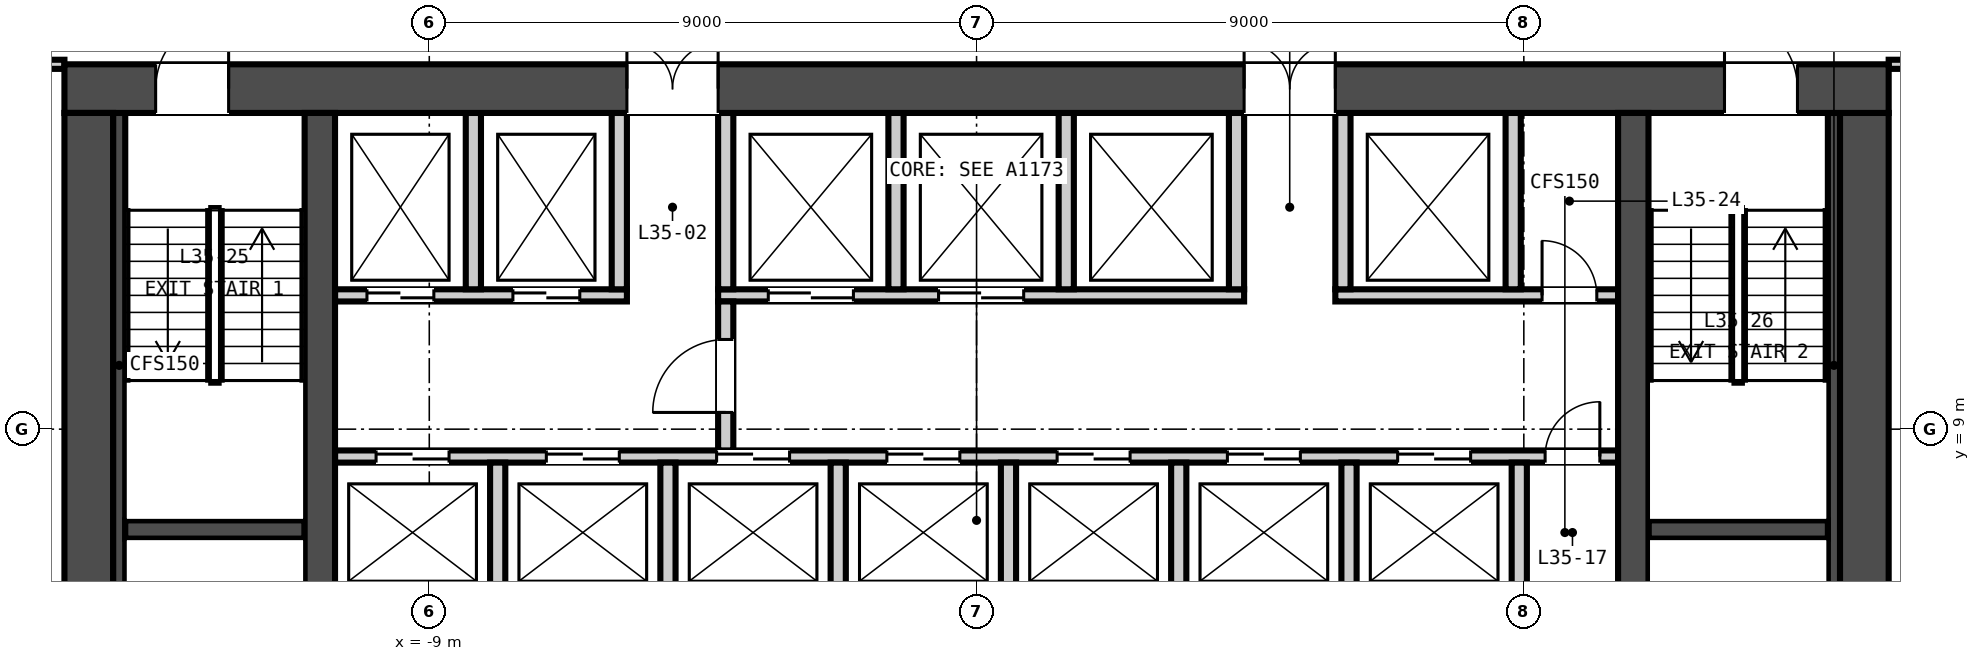
"""IFC4 building model, lengths in metres.
Left out: names, types, materials, properties, quantities, classifications, styles, units other than length and angle.
Written with IfcOpenShell. Run it as: python <this file> out.ifc"""

import sys

from ifc_helpers import new_model, si_unit, direction, frame, frame_2d, origin, place, context, subcontext, project, spatial, rectangle, extrude, element, fill, save


model = new_model("IFC4")
c1 = context("Model", 3, precision=1e-05, world=origin(), true_north=direction((0.0, 1.0)))
c2 = subcontext(c1, "Body", "Model", "MODEL_VIEW")
j1 = project(units=[si_unit("LENGTHUNIT", "METRE"), si_unit("PLANEANGLEUNIT", "RADIAN")], contexts=[c1])
p1 = place(None, origin())
s1 = spatial("IfcSite", under=j1, at=p1, CompositionType="ELEMENT")
p2 = place(p1, origin())
s2 = spatial("IfcBuilding", under=s1, at=p2, CompositionType="ELEMENT")
p3 = place(p2, frame((0.0, 0.0, 144.4)))
s3 = spatial("IfcBuildingStorey", under=s2, at=p3, CompositionType="ELEMENT", Elevation=144.4)
p4 = place(p3, frame((-15.0, 14.6, -0.15), z_axis=(0.0, 0.0, 1.0), x_axis=(1.0, 0.0, 0.0)))
e1 = element("IfcWall", 1, at=p4, inside=s3, PredefinedType="SOLIDWALL", context=c2, shape_type="SweptSolid", body=[
    extrude(rectangle(XDim=30.0, YDim=0.8, at=frame_2d((15.0, 0.0))), origin(), (0.0, 0.0, 1.0), 3.65),
])
p5 = place(p4, frame((9.25, 0.0, 0.15)))
e2 = element("IfcOpeningElement", 2, at=p5, cuts=e1, PredefinedType="OPENING", context=c2, shape_type="SweptSolid", body=[
    extrude(rectangle(XDim=1.5, YDim=2.1, at=frame_2d((0.75, 1.05))), frame((0.0, 0.41, 0.0), z_axis=(0.0, -1.0, 0.0), x_axis=(1.0, 0.0, 0.0)), (0.0, 0.0, 1.0), 0.82),
])
p6 = place(p4, frame((19.4, 0.0, 0.15)))
e3 = element("IfcOpeningElement", 3, at=p6, cuts=e1, PredefinedType="OPENING", context=c2, shape_type="SweptSolid", body=[
    extrude(rectangle(XDim=1.5, YDim=2.1, at=frame_2d((0.75, 1.05))), frame((0.0, 0.41, 0.0), z_axis=(0.0, -1.0, 0.0), x_axis=(1.0, 0.0, 0.0)), (0.0, 0.0, 1.0), 0.82),
])
p7 = place(p4, frame((1.5, 0.0, 0.15)))
e4 = element("IfcOpeningElement", 4, at=p7, cuts=e1, PredefinedType="OPENING", context=c2, shape_type="SweptSolid", body=[
    extrude(rectangle(XDim=1.2, YDim=2.1, at=frame_2d((0.6, 1.05))), frame((0.0, 0.41, 0.0), z_axis=(0.0, -1.0, 0.0), x_axis=(1.0, 0.0, 0.0)), (0.0, 0.0, 1.0), 0.82),
])
p8 = place(p4, frame((27.3, 0.0, 0.15)))
e5 = element("IfcOpeningElement", 5, at=p8, cuts=e1, PredefinedType="OPENING", context=c2, shape_type="SweptSolid", body=[
    extrude(rectangle(XDim=1.2, YDim=2.1, at=frame_2d((0.6, 1.05))), frame((0.0, 0.41, 0.0), z_axis=(0.0, -1.0, 0.0), x_axis=(1.0, 0.0, 0.0)), (0.0, 0.0, 1.0), 0.82),
])
for number, where, z_axis, x_axis in (
    (6, (-14.6, 0.8, -0.15), (0.0, 0.0, 1.0), (0.0, 1.0, 0.0)),
    (7, (14.6, 0.8, -0.15), (0.0, 0.0, 1.0), (0.0, 1.0, 0.0)),
):
    element("IfcWall", number, at=place(p3, frame(where, z_axis=z_axis, x_axis=x_axis)), inside=s3, PredefinedType="SOLIDWALL", context=c2, shape_type="SweptSolid", body=[
        extrude(rectangle(XDim=13.4, YDim=0.8, at=frame_2d((6.7, 0.0))), origin(), (0.0, 0.0, 1.0), 3.65),
    ])
for number, where, z_axis, x_axis in (
    (8, (-10.8, 0.8, -0.15), (0.0, 0.0, 1.0), (0.0, 1.0, 0.0)),
    (9, (10.8, 0.8, -0.15), (0.0, 0.0, 1.0), (0.0, 1.0, 0.0)),
):
    element("IfcWall", number, at=place(p3, frame(where, z_axis=z_axis, x_axis=x_axis)), inside=s3, PredefinedType="SOLIDWALL", context=c2, shape_type="SweptSolid", body=[
        extrude(rectangle(XDim=13.4, YDim=0.5, at=frame_2d((6.7, 0.0))), origin(), (0.0, 0.0, 1.0), 3.65),
    ])
p9 = place(p3, frame((-10.55, 8.55, 0.0), z_axis=(0.0, 0.0, 1.0), x_axis=(1.0, 0.0, 0.0)))
e10 = element("IfcWall", 10, at=p9, inside=s3, PredefinedType="PARTITIONING", context=c2, shape_type="SweptSolid", body=[
    extrude(rectangle(XDim=21.1, YDim=0.2, at=frame_2d((10.55, 0.0))), origin(), (0.0, 0.0, 1.0), 3.5),
])
p10 = place(p9, frame((0.675, 0.0, 0.0)))
e11 = element("IfcOpeningElement", 11, at=p10, cuts=e10, PredefinedType="OPENING", context=c2, shape_type="SweptSolid", body=[
    extrude(rectangle(XDim=1.2, YDim=2.1, at=frame_2d((0.6, 1.05))), frame((0.0, 0.11, 0.0), z_axis=(0.0, -1.0, 0.0), x_axis=(1.0, 0.0, 0.0)), (0.0, 0.0, 1.0), 0.22),
])
p11 = place(p9, frame((3.475, 0.0, 0.0)))
e12 = element("IfcOpeningElement", 12, at=p11, cuts=e10, PredefinedType="OPENING", context=c2, shape_type="SweptSolid", body=[
    extrude(rectangle(XDim=1.2, YDim=2.1, at=frame_2d((0.6, 1.05))), frame((0.0, 0.11, 0.0), z_axis=(0.0, -1.0, 0.0), x_axis=(1.0, 0.0, 0.0)), (0.0, 0.0, 1.0), 0.22),
])
p12 = place(p9, frame((6.275, 0.0, 0.0)))
e13 = element("IfcOpeningElement", 13, at=p12, cuts=e10, PredefinedType="OPENING", context=c2, shape_type="SweptSolid", body=[
    extrude(rectangle(XDim=1.2, YDim=2.1, at=frame_2d((0.6, 1.05))), frame((0.0, 0.11, 0.0), z_axis=(0.0, -1.0, 0.0), x_axis=(1.0, 0.0, 0.0)), (0.0, 0.0, 1.0), 0.22),
])
p13 = place(p9, frame((9.075, 0.0, 0.0)))
e14 = element("IfcOpeningElement", 14, at=p13, cuts=e10, PredefinedType="OPENING", context=c2, shape_type="SweptSolid", body=[
    extrude(rectangle(XDim=1.2, YDim=2.1, at=frame_2d((0.6, 1.05))), frame((0.0, 0.11, 0.0), z_axis=(0.0, -1.0, 0.0), x_axis=(1.0, 0.0, 0.0)), (0.0, 0.0, 1.0), 0.22),
])
p14 = place(p9, frame((11.875, 0.0, 0.0)))
e15 = element("IfcOpeningElement", 15, at=p14, cuts=e10, PredefinedType="OPENING", context=c2, shape_type="SweptSolid", body=[
    extrude(rectangle(XDim=1.2, YDim=2.1, at=frame_2d((0.6, 1.05))), frame((0.0, 0.11, 0.0), z_axis=(0.0, -1.0, 0.0), x_axis=(1.0, 0.0, 0.0)), (0.0, 0.0, 1.0), 0.22),
])
p15 = place(p9, frame((14.675, 0.0, 0.0)))
e16 = element("IfcOpeningElement", 16, at=p15, cuts=e10, PredefinedType="OPENING", context=c2, shape_type="SweptSolid", body=[
    extrude(rectangle(XDim=1.2, YDim=2.1, at=frame_2d((0.6, 1.05))), frame((0.0, 0.11, 0.0), z_axis=(0.0, -1.0, 0.0), x_axis=(1.0, 0.0, 0.0)), (0.0, 0.0, 1.0), 0.22),
])
p16 = place(p9, frame((17.475, 0.0, 0.0)))
e17 = element("IfcOpeningElement", 17, at=p16, cuts=e10, PredefinedType="OPENING", context=c2, shape_type="SweptSolid", body=[
    extrude(rectangle(XDim=1.2, YDim=2.1, at=frame_2d((0.6, 1.05))), frame((0.0, 0.11, 0.0), z_axis=(0.0, -1.0, 0.0), x_axis=(1.0, 0.0, 0.0)), (0.0, 0.0, 1.0), 0.22),
])
p17 = place(p9, frame((19.9, 0.0, 0.0)))
e18 = element("IfcOpeningElement", 18, at=p17, cuts=e10, PredefinedType="OPENING", context=c2, shape_type="SweptSolid", body=[
    extrude(rectangle(XDim=0.9, YDim=2.1, at=frame_2d((0.45, 1.05))), frame((0.0, 0.11, 0.0), z_axis=(0.0, -1.0, 0.0), x_axis=(1.0, 0.0, 0.0)), (0.0, 0.0, 1.0), 0.22),
])
p18 = place(p3, frame((-10.55, 11.2, 0.0), z_axis=(0.0, 0.0, 1.0), x_axis=(1.0, 0.0, 0.0)))
e19 = element("IfcWall", 19, at=p18, inside=s3, PredefinedType="PARTITIONING", context=c2, shape_type="SweptSolid", body=[
    extrude(rectangle(XDim=4.8, YDim=0.2, at=frame_2d((2.4, 0.0))), origin(), (0.0, 0.0, 1.0), 3.5),
])
p19 = place(p18, frame((0.525, 0.0, 0.0)))
e20 = element("IfcOpeningElement", 20, at=p19, cuts=e19, PredefinedType="OPENING", context=c2, shape_type="SweptSolid", body=[
    extrude(rectangle(XDim=1.1, YDim=2.1, at=frame_2d((0.55, 1.05))), frame((0.0, 0.11, 0.0), z_axis=(0.0, -1.0, 0.0), x_axis=(1.0, 0.0, 0.0)), (0.0, 0.0, 1.0), 0.22),
])
p20 = place(p18, frame((2.925, 0.0, 0.0)))
e21 = element("IfcOpeningElement", 21, at=p20, cuts=e19, PredefinedType="OPENING", context=c2, shape_type="SweptSolid", body=[
    extrude(rectangle(XDim=1.1, YDim=2.1, at=frame_2d((0.55, 1.05))), frame((0.0, 0.11, 0.0), z_axis=(0.0, -1.0, 0.0), x_axis=(1.0, 0.0, 0.0)), (0.0, 0.0, 1.0), 0.22),
])
p21 = place(p3, frame((-4.25, 11.2, 0.0), z_axis=(0.0, 0.0, 1.0), x_axis=(1.0, 0.0, 0.0)))
e22 = element("IfcWall", 22, at=p21, inside=s3, PredefinedType="PARTITIONING", context=c2, shape_type="SweptSolid", body=[
    extrude(rectangle(XDim=8.65, YDim=0.2, at=frame_2d((4.325, 0.0))), origin(), (0.0, 0.0, 1.0), 3.5),
])
p22 = place(p21, frame((0.825, 0.0, 0.0)))
e23 = element("IfcOpeningElement", 23, at=p22, cuts=e22, PredefinedType="OPENING", context=c2, shape_type="SweptSolid", body=[
    extrude(rectangle(XDim=1.4, YDim=2.1, at=frame_2d((0.7, 1.05))), frame((0.0, 0.11, 0.0), z_axis=(0.0, -1.0, 0.0), x_axis=(1.0, 0.0, 0.0)), (0.0, 0.0, 1.0), 0.22),
])
p23 = place(p21, frame((3.625, 0.0, 0.0)))
e24 = element("IfcOpeningElement", 24, at=p23, cuts=e22, PredefinedType="OPENING", context=c2, shape_type="SweptSolid", body=[
    extrude(rectangle(XDim=1.4, YDim=2.1, at=frame_2d((0.7, 1.05))), frame((0.0, 0.11, 0.0), z_axis=(0.0, -1.0, 0.0), x_axis=(1.0, 0.0, 0.0)), (0.0, 0.0, 1.0), 0.22),
])
p24 = place(p3, frame((5.9, 11.2, 0.0), z_axis=(0.0, 0.0, 1.0), x_axis=(1.0, 0.0, 0.0)))
e25 = element("IfcWall", 25, at=p24, inside=s3, PredefinedType="PARTITIONING", context=c2, shape_type="SweptSolid", body=[
    extrude(rectangle(XDim=4.65, YDim=0.2, at=frame_2d((2.325, 0.0))), origin(), (0.0, 0.0, 1.0), 3.5),
])
p25 = place(p24, frame((3.4, 0.0, 0.0)))
e26 = element("IfcOpeningElement", 26, at=p25, cuts=e25, PredefinedType="OPENING", context=c2, shape_type="SweptSolid", body=[
    extrude(rectangle(XDim=0.9, YDim=2.1, at=frame_2d((0.45, 1.05))), frame((0.0, 0.11, 0.0), z_axis=(0.0, -1.0, 0.0), x_axis=(1.0, 0.0, 0.0)), (0.0, 0.0, 1.0), 0.22),
])
p26 = place(p3, frame((-4.125, 8.65, 0.0), z_axis=(0.0, 0.0, 1.0), x_axis=(0.0, 1.0, 0.0)))
e27 = element("IfcWall", 27, at=p26, inside=s3, PredefinedType="PARTITIONING", context=c2, shape_type="SweptSolid", body=[
    extrude(rectangle(XDim=2.45, YDim=0.25, at=frame_2d((1.225, 0.0))), origin(), (0.0, 0.0, 1.0), 3.5),
])
p27 = place(p26, frame((0.625, 0.0, 0.0)))
e28 = element("IfcOpeningElement", 28, at=p27, cuts=e27, PredefinedType="OPENING", context=c2, shape_type="SweptSolid", body=[
    extrude(rectangle(XDim=1.2, YDim=2.1, at=frame_2d((0.6, 1.05))), frame((0.0, 0.135, 0.0), z_axis=(0.0, -1.0, 0.0), x_axis=(1.0, 0.0, 0.0)), (0.0, 0.0, 1.0), 0.27),
])
for number, where, z_axis, x_axis in (
    (29, (-7.875, 6.15, 0.0), (0.0, 0.0, 1.0), (0.0, 1.0, 0.0)),
    (30, (-5.075, 6.15, 0.0), (0.0, 0.0, 1.0), (0.0, 1.0, 0.0)),
    (31, (-2.275, 6.15, 0.0), (0.0, 0.0, 1.0), (0.0, 1.0, 0.0)),
    (32, (0.525, 6.15, 0.0), (0.0, 0.0, 1.0), (0.0, 1.0, 0.0)),
    (33, (3.325, 6.15, 0.0), (0.0, 0.0, 1.0), (0.0, 1.0, 0.0)),
    (34, (6.125, 6.15, 0.0), (0.0, 0.0, 1.0), (0.0, 1.0, 0.0)),
    (35, (8.925, 6.15, 0.0), (0.0, 0.0, 1.0), (0.0, 1.0, 0.0)),
):
    element("IfcWall", number, at=place(p3, frame(where, z_axis=z_axis, x_axis=x_axis)), inside=s3, PredefinedType="PARTITIONING", context=c2, shape_type="SweptSolid", body=[
        extrude(rectangle(XDim=2.3, YDim=0.25, at=frame_2d((1.15, 0.0))), origin(), (0.0, 0.0, 1.0), 3.5),
    ])
for number, where, z_axis, x_axis in (
    (36, (-8.275, 11.3, 0.0), (0.0, 0.0, 1.0), (0.0, 1.0, 0.0)),
    (37, (-5.875, 11.3, 0.0), (0.0, 0.0, 1.0), (0.0, 1.0, 0.0)),
    (38, (-4.125, 11.3, 0.0), (0.0, 0.0, 1.0), (0.0, 1.0, 0.0)),
    (39, (-1.325, 11.3, 0.0), (0.0, 0.0, 1.0), (0.0, 1.0, 0.0)),
    (40, (1.475, 11.3, 0.0), (0.0, 0.0, 1.0), (0.0, 1.0, 0.0)),
    (41, (4.275, 11.3, 0.0), (0.0, 0.0, 1.0), (0.0, 1.0, 0.0)),
    (42, (6.025, 11.3, 0.0), (0.0, 0.0, 1.0), (0.0, 1.0, 0.0)),
    (43, (8.825, 11.3, 0.0), (0.0, 0.0, 1.0), (0.0, 1.0, 0.0)),
):
    element("IfcWall", number, at=place(p3, frame(where, z_axis=z_axis, x_axis=x_axis)), inside=s3, PredefinedType="PARTITIONING", context=c2, shape_type="SweptSolid", body=[
        extrude(rectangle(XDim=2.9, YDim=0.25, at=frame_2d((1.45, 0.0))), origin(), (0.0, 0.0, 1.0), 3.5),
    ])
p28 = place(p3, frame((-14.0, 7.35, 0.0), z_axis=(0.0, 0.0, 1.0), x_axis=(1.0, 0.0, 0.0)))
e44 = element("IfcWall", 44, at=p28, inside=s3, PredefinedType="SOLIDWALL", context=c2, shape_type="SweptSolid", body=[
    extrude(rectangle(XDim=2.95, YDim=0.3, at=frame_2d((1.475, 0.0))), origin(), (0.0, 0.0, 1.0), 3.5),
])
p29 = place(p3, frame((-14.1, 0.8, 0.0), z_axis=(0.0, 0.0, 1.0), x_axis=(0.0, 1.0, 0.0)))
e45 = element("IfcWall", 45, at=p29, inside=s3, PredefinedType="SOLIDWALL", context=c2, shape_type="SweptSolid", body=[
    extrude(rectangle(XDim=13.4, YDim=0.2, at=frame_2d((6.7, 0.0))), origin(), (0.0, 0.0, 1.0), 3.5),
])
p30 = place(p3, frame((11.05, 7.35, 0.0), z_axis=(0.0, 0.0, 1.0), x_axis=(1.0, 0.0, 0.0)))
e46 = element("IfcWall", 46, at=p30, inside=s3, PredefinedType="SOLIDWALL", context=c2, shape_type="SweptSolid", body=[
    extrude(rectangle(XDim=2.95, YDim=0.3, at=frame_2d((1.475, 0.0))), origin(), (0.0, 0.0, 1.0), 3.5),
])
p31 = place(p3, frame((14.1, 0.8, 0.0), z_axis=(0.0, 0.0, 1.0), x_axis=(0.0, 1.0, 0.0)))
e47 = element("IfcWall", 47, at=p31, inside=s3, PredefinedType="SOLIDWALL", context=c2, shape_type="SweptSolid", body=[
    extrude(rectangle(XDim=13.4, YDim=0.2, at=frame_2d((6.7, 0.0))), origin(), (0.0, 0.0, 1.0), 3.5),
])
p32 = place(p3, frame((-15.0, 15.0, 0.0), z_axis=(0.0, 0.0, 1.0), x_axis=(-1.0, 0.0, 0.0)))
e48 = element("IfcWall", 48, at=p32, inside=s3, PredefinedType="PARTITIONING", context=c2, shape_type="SweptSolid", body=[
    extrude(rectangle(XDim=1.222, YDim=0.15, at=frame_2d((0.611, 0.0))), origin(), (0.0, 0.0, 1.0), 2.741),
])
p33 = place(p3, frame((16.297, 15.0, 0.0), z_axis=(0.0, 0.0, 1.0), x_axis=(-1.0, 0.0, 0.0)))
e49 = element("IfcWall", 49, at=p33, inside=s3, PredefinedType="PARTITIONING", context=c2, shape_type="SweptSolid", body=[
    extrude(rectangle(XDim=1.297, YDim=0.15, at=frame_2d((0.648, 0.0))), origin(), (0.0, 0.0, 1.0), 2.741),
])
p34 = place(p27, origin())
e50 = element("IfcDoor", 50, at=p34, inside=s3, OperationType="SINGLE_SWING_LEFT", PredefinedType="DOOR", context=c2, shape_type="SweptSolid", body=[
    extrude(rectangle(XDim=1.2, YDim=2.1, at=frame_2d((0.6, 1.05))), frame((0.0, 0.025, 0.0), z_axis=(0.0, -1.0, 0.0), x_axis=(1.0, 0.0, 0.0)), (0.0, 0.0, 1.0), 0.05),
])
fill(e28, e50)
p35 = place(p10, origin())
e51 = element("IfcDoor", 51, at=p35, inside=s3, OperationType="DOUBLE_DOOR_SLIDING", PredefinedType="DOOR", context=c2, shape_type="SweptSolid", body=[
    extrude(rectangle(XDim=1.2, YDim=2.1, at=frame_2d((0.6, 1.05))), frame((0.0, 0.025, 0.0), z_axis=(0.0, -1.0, 0.0), x_axis=(1.0, 0.0, 0.0)), (0.0, 0.0, 1.0), 0.05),
])
fill(e11, e51)
p36 = place(p11, origin())
e52 = element("IfcDoor", 52, at=p36, inside=s3, OperationType="DOUBLE_DOOR_SLIDING", PredefinedType="DOOR", context=c2, shape_type="SweptSolid", body=[
    extrude(rectangle(XDim=1.2, YDim=2.1, at=frame_2d((0.6, 1.05))), frame((0.0, 0.025, 0.0), z_axis=(0.0, -1.0, 0.0), x_axis=(1.0, 0.0, 0.0)), (0.0, 0.0, 1.0), 0.05),
])
fill(e12, e52)
p37 = place(p12, origin())
e53 = element("IfcDoor", 53, at=p37, inside=s3, OperationType="DOUBLE_DOOR_SLIDING", PredefinedType="DOOR", context=c2, shape_type="SweptSolid", body=[
    extrude(rectangle(XDim=1.2, YDim=2.1, at=frame_2d((0.6, 1.05))), frame((0.0, 0.025, 0.0), z_axis=(0.0, -1.0, 0.0), x_axis=(1.0, 0.0, 0.0)), (0.0, 0.0, 1.0), 0.05),
])
fill(e13, e53)
p38 = place(p13, origin())
e54 = element("IfcDoor", 54, at=p38, inside=s3, OperationType="DOUBLE_DOOR_SLIDING", PredefinedType="DOOR", context=c2, shape_type="SweptSolid", body=[
    extrude(rectangle(XDim=1.2, YDim=2.1, at=frame_2d((0.6, 1.05))), frame((0.0, 0.025, 0.0), z_axis=(0.0, -1.0, 0.0), x_axis=(1.0, 0.0, 0.0)), (0.0, 0.0, 1.0), 0.05),
])
fill(e14, e54)
p39 = place(p14, origin())
e55 = element("IfcDoor", 55, at=p39, inside=s3, OperationType="DOUBLE_DOOR_SLIDING", PredefinedType="DOOR", context=c2, shape_type="SweptSolid", body=[
    extrude(rectangle(XDim=1.2, YDim=2.1, at=frame_2d((0.6, 1.05))), frame((0.0, 0.025, 0.0), z_axis=(0.0, -1.0, 0.0), x_axis=(1.0, 0.0, 0.0)), (0.0, 0.0, 1.0), 0.05),
])
fill(e15, e55)
p40 = place(p15, origin())
e56 = element("IfcDoor", 56, at=p40, inside=s3, OperationType="DOUBLE_DOOR_SLIDING", PredefinedType="DOOR", context=c2, shape_type="SweptSolid", body=[
    extrude(rectangle(XDim=1.2, YDim=2.1, at=frame_2d((0.6, 1.05))), frame((0.0, 0.025, 0.0), z_axis=(0.0, -1.0, 0.0), x_axis=(1.0, 0.0, 0.0)), (0.0, 0.0, 1.0), 0.05),
])
fill(e16, e56)
p41 = place(p16, origin())
e57 = element("IfcDoor", 57, at=p41, inside=s3, OperationType="DOUBLE_DOOR_SLIDING", PredefinedType="DOOR", context=c2, shape_type="SweptSolid", body=[
    extrude(rectangle(XDim=1.2, YDim=2.1, at=frame_2d((0.6, 1.05))), frame((0.0, 0.025, 0.0), z_axis=(0.0, -1.0, 0.0), x_axis=(1.0, 0.0, 0.0)), (0.0, 0.0, 1.0), 0.05),
])
fill(e17, e57)
p42 = place(p17, origin())
e58 = element("IfcDoor", 58, at=p42, inside=s3, OperationType="SINGLE_SWING_RIGHT", PredefinedType="DOOR", context=c2, shape_type="SweptSolid", body=[
    extrude(rectangle(XDim=0.9, YDim=2.1, at=frame_2d((0.45, 1.05))), frame((0.0, 0.025, 0.0), z_axis=(0.0, -1.0, 0.0), x_axis=(1.0, 0.0, 0.0)), (0.0, 0.0, 1.0), 0.05),
])
fill(e18, e58)
p43 = place(p19, origin())
e59 = element("IfcDoor", 59, at=p43, inside=s3, OperationType="DOUBLE_DOOR_SLIDING", PredefinedType="DOOR", context=c2, shape_type="SweptSolid", body=[
    extrude(rectangle(XDim=1.1, YDim=2.1, at=frame_2d((0.55, 1.05))), frame((0.0, 0.025, 0.0), z_axis=(0.0, -1.0, 0.0), x_axis=(1.0, 0.0, 0.0)), (0.0, 0.0, 1.0), 0.05),
])
fill(e20, e59)
p44 = place(p20, origin())
e60 = element("IfcDoor", 60, at=p44, inside=s3, OperationType="DOUBLE_DOOR_SLIDING", PredefinedType="DOOR", context=c2, shape_type="SweptSolid", body=[
    extrude(rectangle(XDim=1.1, YDim=2.1, at=frame_2d((0.55, 1.05))), frame((0.0, 0.025, 0.0), z_axis=(0.0, -1.0, 0.0), x_axis=(1.0, 0.0, 0.0)), (0.0, 0.0, 1.0), 0.05),
])
fill(e21, e60)
p45 = place(p22, origin())
e61 = element("IfcDoor", 61, at=p45, inside=s3, OperationType="DOUBLE_DOOR_SLIDING", PredefinedType="DOOR", context=c2, shape_type="SweptSolid", body=[
    extrude(rectangle(XDim=1.4, YDim=2.1, at=frame_2d((0.7, 1.05))), frame((0.0, 0.025, 0.0), z_axis=(0.0, -1.0, 0.0), x_axis=(1.0, 0.0, 0.0)), (0.0, 0.0, 1.0), 0.05),
])
fill(e23, e61)
p46 = place(p23, origin())
e62 = element("IfcDoor", 62, at=p46, inside=s3, OperationType="DOUBLE_DOOR_SLIDING", PredefinedType="DOOR", context=c2, shape_type="SweptSolid", body=[
    extrude(rectangle(XDim=1.4, YDim=2.1, at=frame_2d((0.7, 1.05))), frame((0.0, 0.025, 0.0), z_axis=(0.0, -1.0, 0.0), x_axis=(1.0, 0.0, 0.0)), (0.0, 0.0, 1.0), 0.05),
])
fill(e24, e62)
p47 = place(p25, origin())
e63 = element("IfcDoor", 63, at=p47, inside=s3, OperationType="SINGLE_SWING_LEFT", PredefinedType="DOOR", context=c2, shape_type="SweptSolid", body=[
    extrude(rectangle(XDim=0.9, YDim=2.1, at=frame_2d((0.45, 1.05))), frame((0.0, 0.025, 0.0), z_axis=(0.0, -1.0, 0.0), x_axis=(1.0, 0.0, 0.0)), (0.0, 0.0, 1.0), 0.05),
])
fill(e26, e63)
p48 = place(p5, origin())
e64 = element("IfcDoor", 64, at=p48, inside=s3, OperationType="DOUBLE_DOOR_SINGLE_SWING", PredefinedType="DOOR", context=c2, shape_type="SweptSolid", body=[
    extrude(rectangle(XDim=1.5, YDim=2.1, at=frame_2d((0.75, 1.05))), frame((0.0, 0.025, 0.0), z_axis=(0.0, -1.0, 0.0), x_axis=(1.0, 0.0, 0.0)), (0.0, 0.0, 1.0), 0.05),
])
fill(e2, e64)
p49 = place(p6, origin())
e65 = element("IfcDoor", 65, at=p49, inside=s3, OperationType="DOUBLE_DOOR_SINGLE_SWING", PredefinedType="DOOR", context=c2, shape_type="SweptSolid", body=[
    extrude(rectangle(XDim=1.5, YDim=2.1, at=frame_2d((0.75, 1.05))), frame((0.0, 0.025, 0.0), z_axis=(0.0, -1.0, 0.0), x_axis=(1.0, 0.0, 0.0)), (0.0, 0.0, 1.0), 0.05),
])
fill(e3, e65)
p50 = place(p7, origin())
e66 = element("IfcDoor", 66, at=p50, inside=s3, OperationType="SINGLE_SWING_RIGHT", PredefinedType="DOOR", context=c2, shape_type="SweptSolid", body=[
    extrude(rectangle(XDim=1.2, YDim=2.1, at=frame_2d((0.6, 1.05))), frame((0.0, 0.025, 0.0), z_axis=(0.0, -1.0, 0.0), x_axis=(1.0, 0.0, 0.0)), (0.0, 0.0, 1.0), 0.05),
])
fill(e4, e66)
p51 = place(p8, origin())
e67 = element("IfcDoor", 67, at=p51, inside=s3, OperationType="SINGLE_SWING_LEFT", PredefinedType="DOOR", context=c2, shape_type="SweptSolid", body=[
    extrude(rectangle(XDim=1.2, YDim=2.1, at=frame_2d((0.6, 1.05))), frame((0.0, 0.025, 0.0), z_axis=(0.0, -1.0, 0.0), x_axis=(1.0, 0.0, 0.0)), (0.0, 0.0, 1.0), 0.05),
])
fill(e5, e67)
save(model, sys.argv[1])
